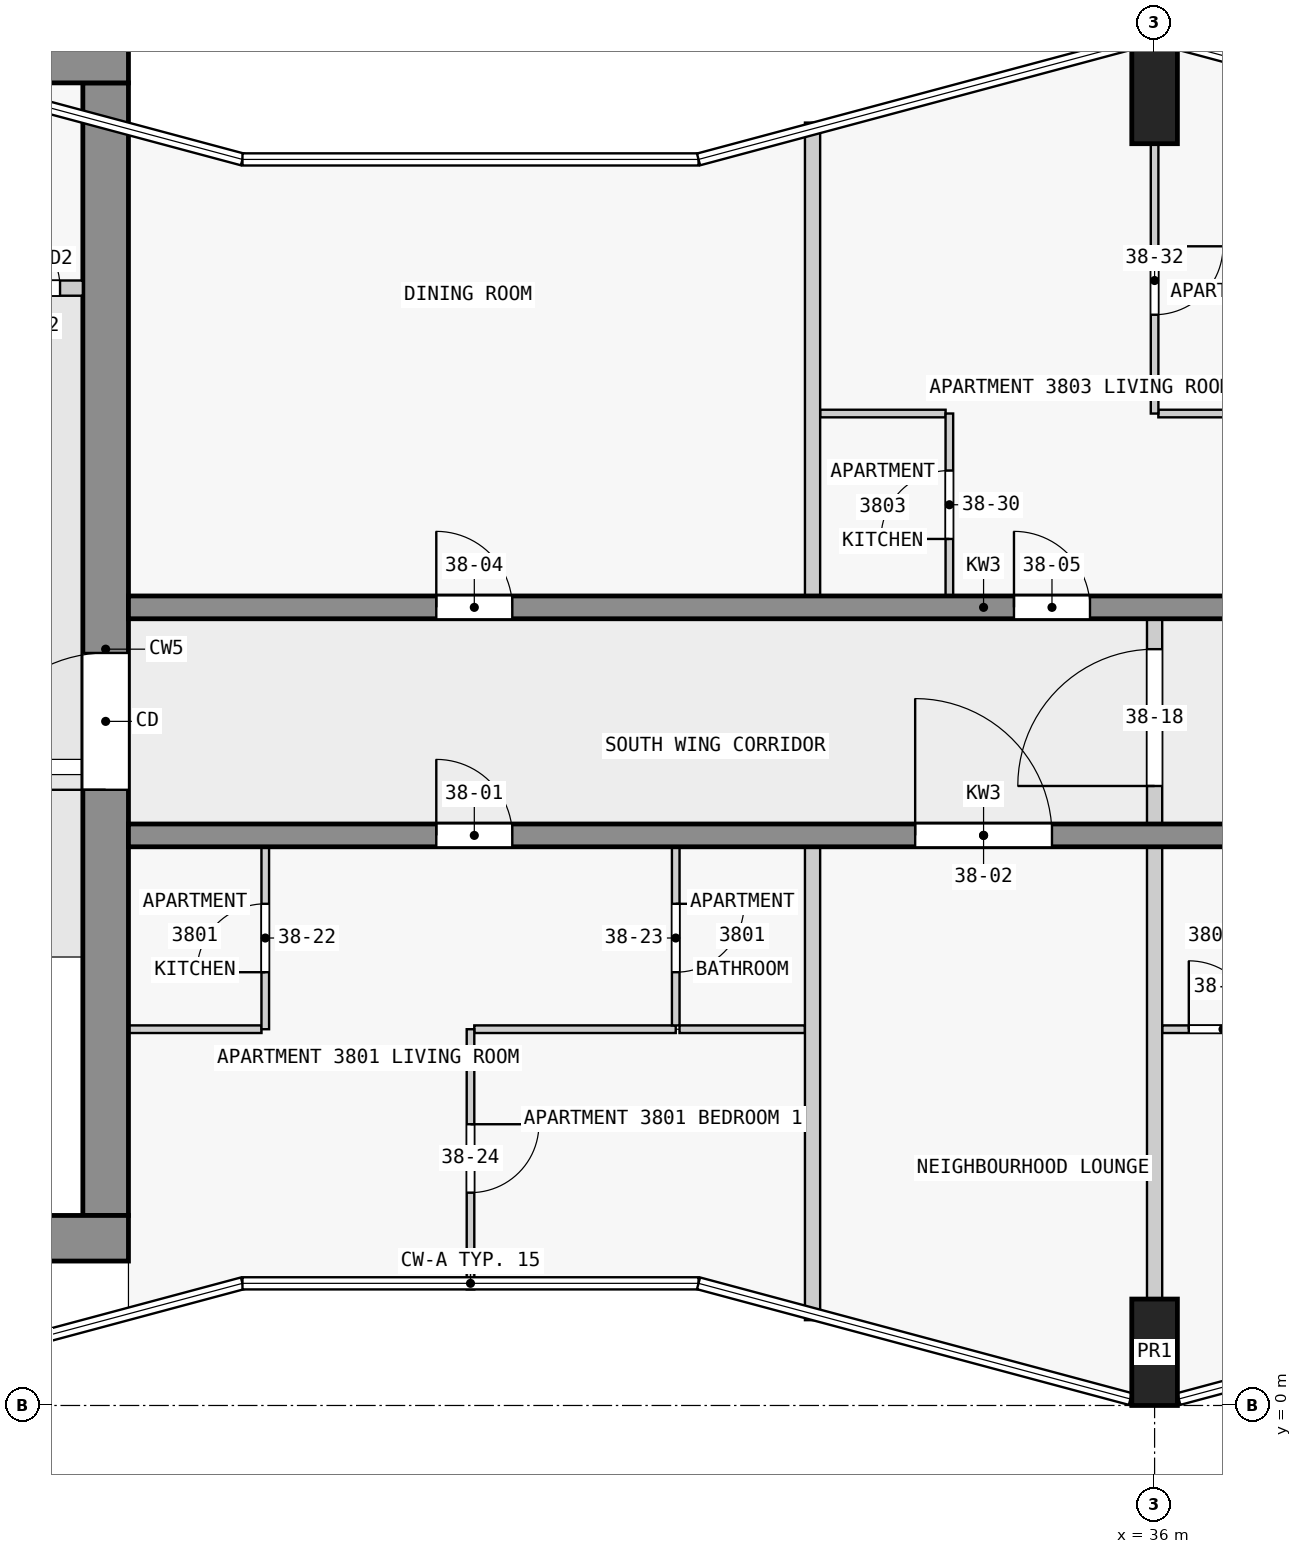
"""IFC4 building model, lengths in metres.
Left out: names, types, materials, properties, quantities, classifications, styles, units other than length and angle.
Written with IfcOpenShell. Run it as: python <this file> out.ifc"""

import sys

from ifc_helpers import new_model, si_unit, direction, frame, frame_2d, origin, origin_2d, place, context, subcontext, project, spatial, rectangle, extrude, element, fill, save


model = new_model("IFC4")
c1 = context("Model", 3, precision=1e-05, world=origin(), true_north=direction((0.0, 1.0)))
c2 = subcontext(c1, "Body", "Model", "MODEL_VIEW")
j1 = project(units=[si_unit("LENGTHUNIT", "METRE"), si_unit("PLANEANGLEUNIT", "RADIAN")], contexts=[c1])
p1 = place(None, origin())
s1 = spatial("IfcSite", under=j1, at=p1, CompositionType="ELEMENT")
p2 = place(p1, origin())
s2 = spatial("IfcBuilding", under=s1, at=p2, CompositionType="ELEMENT")
p3 = place(p2, frame((0.0, 0.0, 149.9)))
s3 = spatial("IfcBuildingStorey", under=s2, at=p3, CompositionType="ELEMENT", Elevation=149.9)
for number, where, z_axis, x_axis in (
    (1, (36.0, 0.7, 0.0), (0.0, 0.0, 1.0), (1.0, 0.0, 0.0)),
    (2, (36.0, 17.3, 0.0), (0.0, 0.0, 1.0), (1.0, 0.0, 0.0)),
):
    element("IfcColumn", number, at=place(p3, frame(where, z_axis=z_axis, x_axis=x_axis)), inside=s3, PredefinedType="COLUMN", context=c2, shape_type="SweptSolid", body=[
        extrude(rectangle(XDim=0.6, YDim=1.4, at=origin_2d()), origin(), (0.0, 0.0, 1.0), 3.5),
    ])
p4 = place(p3, frame((1.7, 2.2, 0.0), z_axis=(0.0, 0.0, 1.0), x_axis=(1.0, 0.0, 0.0)))
e3 = element("IfcWall", 3, at=p4, inside=s3, PredefinedType="SHEAR", context=c2, shape_type="SweptSolid", body=[
    extrude(rectangle(XDim=20.8, YDim=0.6, at=frame_2d((10.4, 0.0))), origin(), (0.0, 0.0, 1.0), 3.25),
])
p5 = place(p3, frame((1.38, 17.7, 0.0), z_axis=(0.0, 0.0, 1.0), x_axis=(1.0, 0.0, 0.0)))
e4 = element("IfcWall", 4, at=p5, inside=s3, PredefinedType="SHEAR", context=c2, shape_type="SweptSolid", body=[
    extrude(rectangle(XDim=21.12, YDim=0.6, at=frame_2d((10.56, 0.0))), origin(), (0.0, 0.0, 1.0), 3.25),
])
p6 = place(p5, frame((6.4, 0.0, 0.0)))
e5 = element("IfcOpeningElement", 5, at=p6, cuts=e4, PredefinedType="OPENING", context=c2, shape_type="SweptSolid", body=[
    extrude(rectangle(XDim=1.8, YDim=2.1, at=frame_2d((0.9, 1.05))), frame((0.0, 0.31, 0.0), z_axis=(0.0, -1.0, 0.0), x_axis=(1.0, 0.0, 0.0)), (0.0, 0.0, 1.0), 0.62),
])
p7 = place(p3, frame((22.2, 2.5, 0.0), z_axis=(0.0, 0.0, 1.0), x_axis=(0.0, 1.0, 0.0)))
e6 = element("IfcWall", 6, at=p7, inside=s3, PredefinedType="SHEAR", context=c2, shape_type="SweptSolid", body=[
    extrude(rectangle(XDim=14.9, YDim=0.6, at=frame_2d((7.45, 0.0))), origin(), (0.0, 0.0, 1.0), 3.25),
])
p8 = place(p7, frame((5.6, 0.0, 0.0)))
e7 = element("IfcOpeningElement", 7, at=p8, cuts=e6, PredefinedType="OPENING", context=c2, shape_type="SweptSolid", body=[
    extrude(rectangle(XDim=1.8, YDim=2.1, at=frame_2d((0.9, 1.05))), frame((0.0, 0.31, 0.0), z_axis=(0.0, -1.0, 0.0), x_axis=(1.0, 0.0, 0.0)), (0.0, 0.0, 1.0), 0.62),
])
p9 = place(p3, frame((22.5, 7.5, 0.0), z_axis=(0.0, 0.0, 1.0), x_axis=(1.0, 0.0, 0.0)))
e8 = element("IfcWall", 8, at=p9, inside=s3, PredefinedType="SHEAR", context=c2, shape_type="SweptSolid", body=[
    extrude(rectangle(XDim=22.5, YDim=0.3, at=frame_2d((11.25, 0.0))), origin(), (0.0, 0.0, 1.0), 3.25),
])
p10 = place(p9, frame((4.05, 0.0, 0.0)))
e9 = element("IfcOpeningElement", 9, at=p10, cuts=e8, PredefinedType="OPENING", context=c2, shape_type="SweptSolid", body=[
    extrude(rectangle(XDim=1.0, YDim=2.1, at=frame_2d((0.5, 1.05))), frame((0.0, 0.16, 0.0), z_axis=(0.0, -1.0, 0.0), x_axis=(1.0, 0.0, 0.0)), (0.0, 0.0, 1.0), 0.32),
])
p11 = place(p9, frame((10.35, 0.0, 0.0)))
e10 = element("IfcOpeningElement", 10, at=p11, cuts=e8, PredefinedType="OPENING", context=c2, shape_type="SweptSolid", body=[
    extrude(rectangle(XDim=1.8, YDim=2.1, at=frame_2d((0.9, 1.05))), frame((0.0, 0.16, 0.0), z_axis=(0.0, -1.0, 0.0), x_axis=(1.0, 0.0, 0.0)), (0.0, 0.0, 1.0), 0.32),
])
p12 = place(p9, frame((16.85, 0.0, 0.0)))
e11 = element("IfcOpeningElement", 11, at=p12, cuts=e8, PredefinedType="OPENING", context=c2, shape_type="SweptSolid", body=[
    extrude(rectangle(XDim=1.0, YDim=2.1, at=frame_2d((0.5, 1.05))), frame((0.0, 0.16, 0.0), z_axis=(0.0, -1.0, 0.0), x_axis=(1.0, 0.0, 0.0)), (0.0, 0.0, 1.0), 0.32),
])
p13 = place(p3, frame((22.5, 10.5, 0.0), z_axis=(0.0, 0.0, 1.0), x_axis=(1.0, 0.0, 0.0)))
e12 = element("IfcWall", 12, at=p13, inside=s3, PredefinedType="SHEAR", context=c2, shape_type="SweptSolid", body=[
    extrude(rectangle(XDim=22.5, YDim=0.3, at=frame_2d((11.25, 0.0))), origin(), (0.0, 0.0, 1.0), 3.25),
])
p14 = place(p13, frame((4.05, 0.0, 0.0)))
e13 = element("IfcOpeningElement", 13, at=p14, cuts=e12, PredefinedType="OPENING", context=c2, shape_type="SweptSolid", body=[
    extrude(rectangle(XDim=1.0, YDim=2.1, at=frame_2d((0.5, 1.05))), frame((0.0, 0.16, 0.0), z_axis=(0.0, -1.0, 0.0), x_axis=(1.0, 0.0, 0.0)), (0.0, 0.0, 1.0), 0.32),
])
p15 = place(p13, frame((11.65, 0.0, 0.0)))
e14 = element("IfcOpeningElement", 14, at=p15, cuts=e12, PredefinedType="OPENING", context=c2, shape_type="SweptSolid", body=[
    extrude(rectangle(XDim=1.0, YDim=2.1, at=frame_2d((0.5, 1.05))), frame((0.0, 0.16, 0.0), z_axis=(0.0, -1.0, 0.0), x_axis=(1.0, 0.0, 0.0)), (0.0, 0.0, 1.0), 0.32),
])
p16 = place(p13, frame((18.75, 0.0, 0.0)))
e15 = element("IfcOpeningElement", 15, at=p16, cuts=e12, PredefinedType="OPENING", context=c2, shape_type="SweptSolid", body=[
    extrude(rectangle(XDim=0.9, YDim=2.1, at=frame_2d((0.45, 1.05))), frame((0.0, 0.16, 0.0), z_axis=(0.0, -1.0, 0.0), x_axis=(1.0, 0.0, 0.0)), (0.0, 0.0, 1.0), 0.32),
])
p17 = place(p13, frame((20.95, 0.0, 0.0)))
e16 = element("IfcOpeningElement", 16, at=p17, cuts=e12, PredefinedType="OPENING", context=c2, shape_type="SweptSolid", body=[
    extrude(rectangle(XDim=1.0, YDim=2.1, at=frame_2d((0.5, 1.05))), frame((0.0, 0.16, 0.0), z_axis=(0.0, -1.0, 0.0), x_axis=(1.0, 0.0, 0.0)), (0.0, 0.0, 1.0), 0.32),
])
p18 = place(p3, frame((18.6, 14.7, 0.0), z_axis=(0.0, 0.0, 1.0), x_axis=(1.0, 0.0, 0.0)))
e17 = element("IfcWall", 17, at=p18, inside=s3, PredefinedType="PARTITIONING", context=c2, shape_type="SweptSolid", body=[
    extrude(rectangle(XDim=3.3, YDim=0.2, at=frame_2d((1.65, 0.0))), origin(), (0.0, 0.0, 1.0), 3.25),
])
p19 = place(p18, frame((0.45, 0.0, 0.0)))
e18 = element("IfcOpeningElement", 18, at=p19, cuts=e17, PredefinedType="OPENING", context=c2, shape_type="SweptSolid", body=[
    extrude(rectangle(XDim=0.9, YDim=2.1, at=frame_2d((0.45, 1.05))), frame((0.0, 0.11, 0.0), z_axis=(0.0, -1.0, 0.0), x_axis=(1.0, 0.0, 0.0)), (0.0, 0.0, 1.0), 0.22),
])
p20 = place(p18, frame((2.1, 0.0, 0.0)))
e19 = element("IfcOpeningElement", 19, at=p20, cuts=e17, PredefinedType="OPENING", context=c2, shape_type="SweptSolid", body=[
    extrude(rectangle(XDim=0.9, YDim=2.1, at=frame_2d((0.45, 1.05))), frame((0.0, 0.11, 0.0), z_axis=(0.0, -1.0, 0.0), x_axis=(1.0, 0.0, 0.0)), (0.0, 0.0, 1.0), 0.22),
])
p21 = place(p3, frame((29.7, 4.95, 0.0), z_axis=(0.0, 0.0, 1.0), x_axis=(-1.0, 0.0, 0.0)))
e20 = element("IfcWall", 20, at=p21, inside=s3, PredefinedType="PARTITIONING", context=c2, shape_type="SweptSolid", body=[
    extrude(rectangle(XDim=2.65, YDim=0.1, at=frame_2d((1.325, 0.0))), origin(), (0.0, 0.0, 1.0), 3.25),
])
p22 = place(p3, frame((22.5, 4.95, 0.0), z_axis=(0.0, 0.0, 1.0), x_axis=(1.0, 0.0, 0.0)))
e21 = element("IfcWall", 21, at=p22, inside=s3, PredefinedType="PARTITIONING", context=c2, shape_type="SweptSolid", body=[
    extrude(rectangle(XDim=1.75, YDim=0.1, at=frame_2d((0.875, 0.0))), origin(), (0.0, 0.0, 1.0), 3.25),
])
p23 = place(p3, frame((29.75, 4.95, 0.0), z_axis=(0.0, 0.0, 1.0), x_axis=(1.0, 0.0, 0.0)))
e22 = element("IfcWall", 22, at=p23, inside=s3, PredefinedType="PARTITIONING", context=c2, shape_type="SweptSolid", body=[
    extrude(rectangle(XDim=1.65, YDim=0.1, at=frame_2d((0.825, 0.0))), origin(), (0.0, 0.0, 1.0), 3.25),
])
p24 = place(p3, frame((36.1, 4.95, 0.0), z_axis=(0.0, 0.0, 1.0), x_axis=(1.0, 0.0, 0.0)))
e23 = element("IfcWall", 23, at=p24, inside=s3, PredefinedType="PARTITIONING", context=c2, shape_type="SweptSolid", body=[
    extrude(rectangle(XDim=3.0, YDim=0.1, at=frame_2d((1.5, 0.0))), origin(), (0.0, 0.0, 1.0), 3.25),
])
p25 = place(p24, frame((0.35, 0.0, 0.0)))
e24 = element("IfcOpeningElement", 24, at=p25, cuts=e23, PredefinedType="OPENING", context=c2, shape_type="SweptSolid", body=[
    extrude(rectangle(XDim=0.9, YDim=2.1, at=frame_2d((0.45, 1.05))), frame((0.0, 0.06, 0.0), z_axis=(0.0, -1.0, 0.0), x_axis=(1.0, 0.0, 0.0)), (0.0, 0.0, 1.0), 0.12),
])
p26 = place(p3, frame((33.25, 13.05, 0.0), z_axis=(0.0, 0.0, 1.0), x_axis=(-1.0, 0.0, 0.0)))
e25 = element("IfcWall", 25, at=p26, inside=s3, PredefinedType="PARTITIONING", context=c2, shape_type="SweptSolid", body=[
    extrude(rectangle(XDim=1.65, YDim=0.1, at=frame_2d((0.825, 0.0))), origin(), (0.0, 0.0, 1.0), 3.25),
])
p27 = place(p3, frame((36.05, 13.05, 0.0), z_axis=(0.0, 0.0, 1.0), x_axis=(1.0, 0.0, 0.0)))
e26 = element("IfcWall", 26, at=p27, inside=s3, PredefinedType="PARTITIONING", context=c2, shape_type="SweptSolid", body=[
    extrude(rectangle(XDim=2.65, YDim=0.1, at=frame_2d((1.325, 0.0))), origin(), (0.0, 0.0, 1.0), 3.25),
])
p28 = place(p3, frame((24.3, 4.95, 0.0), z_axis=(0.0, 0.0, 1.0), x_axis=(0.0, 1.0, 0.0)))
e27 = element("IfcWall", 27, at=p28, inside=s3, PredefinedType="PARTITIONING", context=c2, shape_type="SweptSolid", body=[
    extrude(rectangle(XDim=2.4, YDim=0.1, at=frame_2d((1.2, 0.0))), origin(), (0.0, 0.0, 1.0), 3.25),
])
p29 = place(p28, frame((0.75, 0.0, 0.0)))
e28 = element("IfcOpeningElement", 28, at=p29, cuts=e27, PredefinedType="OPENING", context=c2, shape_type="SweptSolid", body=[
    extrude(rectangle(XDim=0.9, YDim=2.1, at=frame_2d((0.45, 1.05))), frame((0.0, 0.06, 0.0), z_axis=(0.0, -1.0, 0.0), x_axis=(1.0, 0.0, 0.0)), (0.0, 0.0, 1.0), 0.12),
])
p30 = place(p3, frame((27.0, 4.95, 0.0), z_axis=(0.0, 0.0, 1.0), x_axis=(0.0, -1.0, 0.0)))
e29 = element("IfcWall", 29, at=p30, inside=s3, PredefinedType="PARTITIONING", context=c2, shape_type="SweptSolid", body=[
    extrude(rectangle(XDim=3.423, YDim=0.1, at=frame_2d((1.711, 0.0))), origin(), (0.0, 0.0, 1.0), 3.25),
])
p31 = place(p30, frame((1.25, 0.0, 0.0)))
e30 = element("IfcOpeningElement", 30, at=p31, cuts=e29, PredefinedType="OPENING", context=c2, shape_type="SweptSolid", body=[
    extrude(rectangle(XDim=0.9, YDim=2.1, at=frame_2d((0.45, 1.05))), frame((0.0, 0.06, 0.0), z_axis=(0.0, -1.0, 0.0), x_axis=(1.0, 0.0, 0.0)), (0.0, 0.0, 1.0), 0.12),
])
p32 = place(p3, frame((29.7, 7.35, 0.0), z_axis=(0.0, 0.0, 1.0), x_axis=(0.0, -1.0, 0.0)))
e31 = element("IfcWall", 31, at=p32, inside=s3, PredefinedType="PARTITIONING", context=c2, shape_type="SweptSolid", body=[
    extrude(rectangle(XDim=2.35, YDim=0.1, at=frame_2d((1.175, 0.0))), origin(), (0.0, 0.0, 1.0), 3.25),
])
p33 = place(p32, frame((0.75, 0.0, 0.0)))
e32 = element("IfcOpeningElement", 32, at=p33, cuts=e31, PredefinedType="OPENING", context=c2, shape_type="SweptSolid", body=[
    extrude(rectangle(XDim=0.9, YDim=2.1, at=frame_2d((0.45, 1.05))), frame((0.0, 0.06, 0.0), z_axis=(0.0, -1.0, 0.0), x_axis=(1.0, 0.0, 0.0)), (0.0, 0.0, 1.0), 0.12),
])
for number, where, z_axis, x_axis in (
    (33, (31.5, 1.122, 0.0), (0.0, 0.0, 1.0), (0.0, 1.0, 0.0)),
    (34, (31.5, 10.65, 0.0), (0.0, 0.0, 1.0), (0.0, 1.0, 0.0)),
):
    element("IfcWall", number, at=place(p3, frame(where, z_axis=z_axis, x_axis=x_axis)), inside=s3, PredefinedType="PARTITIONING", context=c2, shape_type="SweptSolid", body=[
        extrude(rectangle(XDim=6.228, YDim=0.2, at=frame_2d((3.114, 0.0))), origin(), (0.0, 0.0, 1.0), 3.25),
    ])
p34 = place(p3, frame((33.3, 10.65, 0.0), z_axis=(0.0, 0.0, 1.0), x_axis=(0.0, 1.0, 0.0)))
e35 = element("IfcWall", 35, at=p34, inside=s3, PredefinedType="PARTITIONING", context=c2, shape_type="SweptSolid", body=[
    extrude(rectangle(XDim=2.4, YDim=0.1, at=frame_2d((1.2, 0.0))), origin(), (0.0, 0.0, 1.0), 3.25),
])
p35 = place(p34, frame((0.75, 0.0, 0.0)))
e36 = element("IfcOpeningElement", 36, at=p35, cuts=e35, PredefinedType="OPENING", context=c2, shape_type="SweptSolid", body=[
    extrude(rectangle(XDim=0.9, YDim=2.1, at=frame_2d((0.45, 1.05))), frame((0.0, 0.06, 0.0), z_axis=(0.0, -1.0, 0.0), x_axis=(1.0, 0.0, 0.0)), (0.0, 0.0, 1.0), 0.12),
])
p36 = place(p3, frame((36.0, 16.6, 0.0), z_axis=(0.0, 0.0, 1.0), x_axis=(0.0, -1.0, 0.0)))
e37 = element("IfcWall", 37, at=p36, inside=s3, PredefinedType="PARTITIONING", context=c2, shape_type="SweptSolid", body=[
    extrude(rectangle(XDim=3.55, YDim=0.1, at=frame_2d((1.775, 0.0))), origin(), (0.0, 0.0, 1.0), 3.25),
])
p37 = place(p36, frame((1.35, 0.0, 0.0)))
e38 = element("IfcOpeningElement", 38, at=p37, cuts=e37, PredefinedType="OPENING", context=c2, shape_type="SweptSolid", body=[
    extrude(rectangle(XDim=0.9, YDim=2.1, at=frame_2d((0.45, 1.05))), frame((0.0, 0.06, 0.0), z_axis=(0.0, -1.0, 0.0), x_axis=(1.0, 0.0, 0.0)), (0.0, 0.0, 1.0), 0.12),
])
p38 = place(p3, frame((36.0, 1.4, 0.0), z_axis=(0.0, 0.0, 1.0), x_axis=(0.0, 1.0, 0.0)))
e39 = element("IfcWall", 39, at=p38, inside=s3, PredefinedType="PARTITIONING", context=c2, shape_type="SweptSolid", body=[
    extrude(rectangle(XDim=5.95, YDim=0.2, at=frame_2d((2.975, 0.0))), origin(), (0.0, 0.0, 1.0), 3.25),
])
p39 = place(p3, frame((36.0, 7.45, 0.0), z_axis=(0.0, 0.0, 1.0), x_axis=(0.0, 1.0, 0.0)))
e40 = element("IfcWall", 40, at=p39, inside=s3, PredefinedType="PARTITIONING", context=c2, shape_type="SweptSolid", body=[
    extrude(rectangle(XDim=3.2, YDim=0.2, at=frame_2d((1.6, 0.0))), origin(), (0.0, 0.0, 1.0), 3.25),
])
p40 = place(p39, frame((0.7, 0.0, 0.0)))
e41 = element("IfcOpeningElement", 41, at=p40, cuts=e40, PredefinedType="OPENING", context=c2, shape_type="SweptSolid", body=[
    extrude(rectangle(XDim=1.8, YDim=2.1, at=frame_2d((0.9, 1.05))), frame((0.0, 0.11, 0.0), z_axis=(0.0, -1.0, 0.0), x_axis=(1.0, 0.0, 0.0)), (0.0, 0.0, 1.0), 0.22),
])
p41 = place(p8, origin())
e42 = element("IfcDoor", 42, at=p41, inside=s3, OperationType="DOUBLE_DOOR_SINGLE_SWING", PredefinedType="DOOR", context=c2, shape_type="SweptSolid", body=[
    extrude(rectangle(XDim=1.8, YDim=2.1, at=frame_2d((0.9, 1.05))), frame((0.0, 0.025, 0.0), z_axis=(0.0, -1.0, 0.0), x_axis=(1.0, 0.0, 0.0)), (0.0, 0.0, 1.0), 0.05),
])
fill(e7, e42)
p42 = place(p20, origin())
e43 = element("IfcDoor", 43, at=p42, inside=s3, OperationType="SINGLE_SWING_LEFT", PredefinedType="DOOR", context=c2, shape_type="SweptSolid", body=[
    extrude(rectangle(XDim=0.9, YDim=2.1, at=frame_2d((0.45, 1.05))), frame((0.0, 0.025, 0.0), z_axis=(0.0, -1.0, 0.0), x_axis=(1.0, 0.0, 0.0)), (0.0, 0.0, 1.0), 0.05),
])
fill(e19, e43)
p43 = place(p10, origin())
e44 = element("IfcDoor", 44, at=p43, inside=s3, OperationType="SINGLE_SWING_LEFT", PredefinedType="DOOR", context=c2, shape_type="SweptSolid", body=[
    extrude(rectangle(XDim=1.0, YDim=2.1, at=frame_2d((0.5, 1.05))), frame((0.0, 0.025, 0.0), z_axis=(0.0, -1.0, 0.0), x_axis=(1.0, 0.0, 0.0)), (0.0, 0.0, 1.0), 0.05),
])
fill(e9, e44)
p44 = place(p11, origin())
e45 = element("IfcDoor", 45, at=p44, inside=s3, OperationType="SINGLE_SWING_LEFT", PredefinedType="DOOR", context=c2, shape_type="SweptSolid", body=[
    extrude(rectangle(XDim=1.8, YDim=2.1, at=frame_2d((0.9, 1.05))), frame((0.0, 0.025, 0.0), z_axis=(0.0, -1.0, 0.0), x_axis=(1.0, 0.0, 0.0)), (0.0, 0.0, 1.0), 0.05),
])
fill(e10, e45)
p45 = place(p14, origin())
e46 = element("IfcDoor", 46, at=p45, inside=s3, OperationType="SINGLE_SWING_LEFT", PredefinedType="DOOR", context=c2, shape_type="SweptSolid", body=[
    extrude(rectangle(XDim=1.0, YDim=2.1, at=frame_2d((0.5, 1.05))), frame((0.0, 0.025, 0.0), z_axis=(0.0, -1.0, 0.0), x_axis=(1.0, 0.0, 0.0)), (0.0, 0.0, 1.0), 0.05),
])
fill(e13, e46)
p46 = place(p15, origin())
e47 = element("IfcDoor", 47, at=p46, inside=s3, OperationType="SINGLE_SWING_RIGHT", PredefinedType="DOOR", context=c2, shape_type="SweptSolid", body=[
    extrude(rectangle(XDim=1.0, YDim=2.1, at=frame_2d((0.5, 1.05))), frame((0.0, 0.025, 0.0), z_axis=(0.0, -1.0, 0.0), x_axis=(1.0, 0.0, 0.0)), (0.0, 0.0, 1.0), 0.05),
])
fill(e14, e47)
p47 = place(p40, origin())
e48 = element("IfcDoor", 48, at=p47, inside=s3, OperationType="SINGLE_SWING_LEFT", PredefinedType="DOOR", context=c2, shape_type="SweptSolid", body=[
    extrude(rectangle(XDim=1.8, YDim=2.1, at=frame_2d((0.9, 1.05))), frame((0.0, 0.025, 0.0), z_axis=(0.0, -1.0, 0.0), x_axis=(1.0, 0.0, 0.0)), (0.0, 0.0, 1.0), 0.05),
])
fill(e41, e48)
p48 = place(p29, origin())
e49 = element("IfcDoor", 49, at=p48, inside=s3, OperationType="SINGLE_SWING_RIGHT", PredefinedType="DOOR", context=c2, shape_type="SweptSolid", body=[
    extrude(rectangle(XDim=0.9, YDim=2.1, at=frame_2d((0.45, 1.05))), frame((0.0, 0.025, 0.0), z_axis=(0.0, -1.0, 0.0), x_axis=(1.0, 0.0, 0.0)), (0.0, 0.0, 1.0), 0.05),
])
fill(e28, e49)
p49 = place(p33, origin())
e50 = element("IfcDoor", 50, at=p49, inside=s3, OperationType="SINGLE_SWING_RIGHT", PredefinedType="DOOR", context=c2, shape_type="SweptSolid", body=[
    extrude(rectangle(XDim=0.9, YDim=2.1, at=frame_2d((0.45, 1.05))), frame((0.0, 0.025, 0.0), z_axis=(0.0, -1.0, 0.0), x_axis=(1.0, 0.0, 0.0)), (0.0, 0.0, 1.0), 0.05),
])
fill(e32, e50)
p50 = place(p31, origin())
e51 = element("IfcDoor", 51, at=p50, inside=s3, OperationType="SINGLE_SWING_LEFT", PredefinedType="DOOR", context=c2, shape_type="SweptSolid", body=[
    extrude(rectangle(XDim=0.9, YDim=2.1, at=frame_2d((0.45, 1.05))), frame((0.0, 0.025, 0.0), z_axis=(0.0, -1.0, 0.0), x_axis=(1.0, 0.0, 0.0)), (0.0, 0.0, 1.0), 0.05),
])
fill(e30, e51)
p51 = place(p25, origin())
e52 = element("IfcDoor", 52, at=p51, inside=s3, OperationType="SINGLE_SWING_LEFT", PredefinedType="DOOR", context=c2, shape_type="SweptSolid", body=[
    extrude(rectangle(XDim=0.9, YDim=2.1, at=frame_2d((0.45, 1.05))), frame((0.0, 0.025, 0.0), z_axis=(0.0, -1.0, 0.0), x_axis=(1.0, 0.0, 0.0)), (0.0, 0.0, 1.0), 0.05),
])
fill(e24, e52)
p52 = place(p35, origin())
e53 = element("IfcDoor", 53, at=p52, inside=s3, OperationType="SINGLE_SWING_LEFT", PredefinedType="DOOR", context=c2, shape_type="SweptSolid", body=[
    extrude(rectangle(XDim=0.9, YDim=2.1, at=frame_2d((0.45, 1.05))), frame((0.0, 0.025, 0.0), z_axis=(0.0, -1.0, 0.0), x_axis=(1.0, 0.0, 0.0)), (0.0, 0.0, 1.0), 0.05),
])
fill(e36, e53)
p53 = place(p37, origin())
e54 = element("IfcDoor", 54, at=p53, inside=s3, OperationType="SINGLE_SWING_RIGHT", PredefinedType="DOOR", context=c2, shape_type="SweptSolid", body=[
    extrude(rectangle(XDim=0.9, YDim=2.1, at=frame_2d((0.45, 1.05))), frame((0.0, 0.025, 0.0), z_axis=(0.0, -1.0, 0.0), x_axis=(1.0, 0.0, 0.0)), (0.0, 0.0, 1.0), 0.05),
])
fill(e38, e54)
save(model, sys.argv[1])
